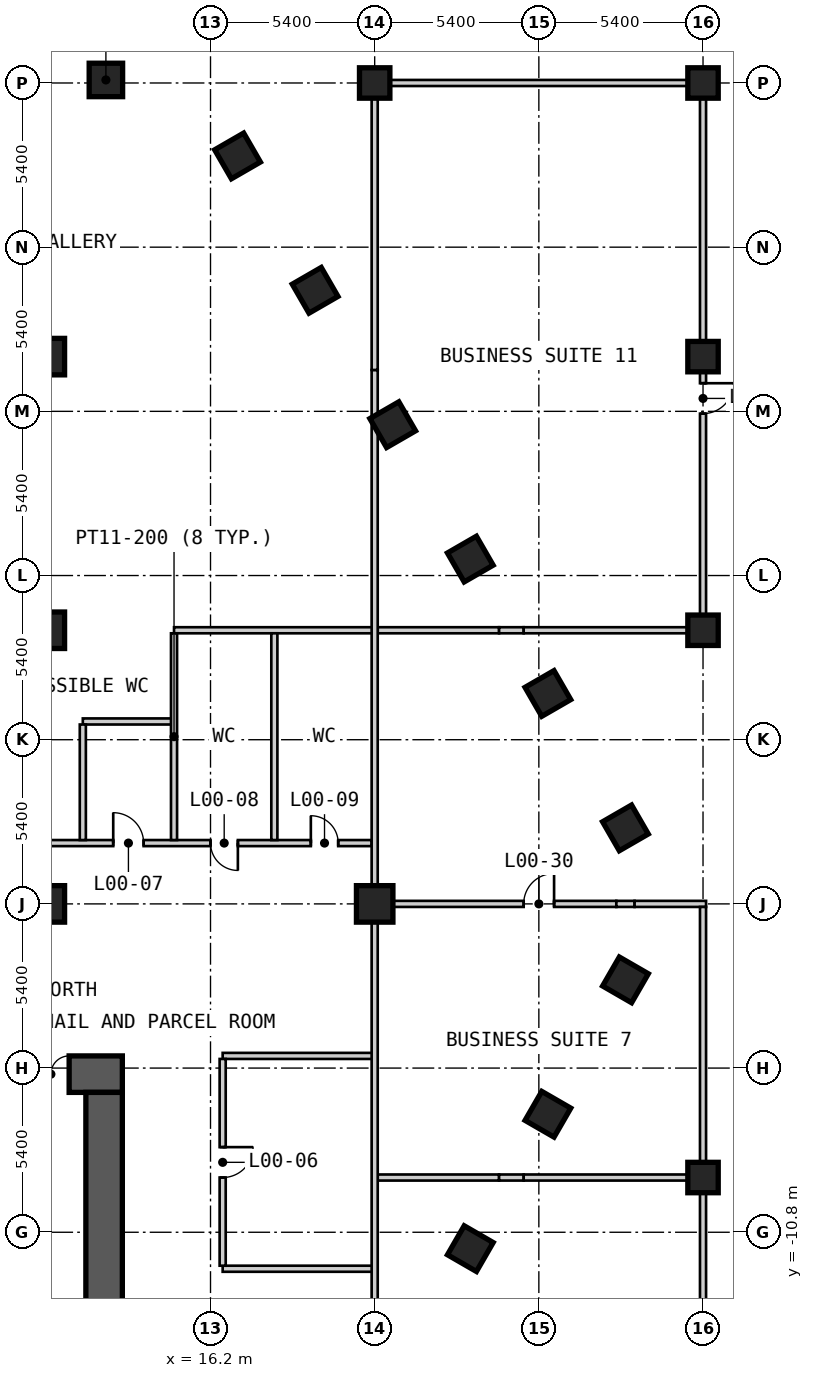
"""IFC4 building model, lengths in metres.
Left out: names, types, materials, properties, quantities, classifications, styles, units other than length and angle.
Written with IfcOpenShell. Run it as: python <this file> out.ifc"""

import sys

from ifc_helpers import new_model, si_unit, direction, frame, frame_2d, origin, origin_2d, place, context, subcontext, project, spatial, rectangle, extrude, element, fill, save


model = new_model("IFC4")
c1 = context("Model", 3, precision=1e-05, world=origin(), true_north=direction((0.0, 1.0)))
c2 = subcontext(c1, "Body", "Model", "MODEL_VIEW")
j1 = project(units=[si_unit("LENGTHUNIT", "METRE"), si_unit("PLANEANGLEUNIT", "RADIAN")], contexts=[c1])
p1 = place(None, origin())
s1 = spatial("IfcSite", under=j1, at=p1, CompositionType="ELEMENT")
p2 = place(p1, origin())
s2 = spatial("IfcBuilding", under=s1, at=p2, CompositionType="ELEMENT")
p3 = place(p2, origin())
s3 = spatial("IfcBuildingStorey", under=s2, at=p3, CompositionType="ELEMENT", Elevation=0.0)
for number, where, z_axis, x_axis in (
    (1, (12.759, 27.1, 0.0), (0.0, 0.0, 1.0), (-1.0, 0.0, 0.0)),
    (2, (24.746, -11.339, 0.0), (0.0, 0.0, 1.0), (0.5, 0.866, 0.0)),
    (3, (27.298, -6.919, 0.0), (0.0, 0.0, 1.0), (0.5, 0.866, 0.0)),
    (4, (29.849, -2.499, 0.0), (0.0, 0.0, 1.0), (0.5, 0.866, 0.0)),
    (5, (29.848, 2.5, 0.0), (0.0, 0.0, 1.0), (-0.5, 0.866, 0.0)),
    (6, (27.297, 6.921, 0.0), (0.0, 0.0, 1.0), (-0.5, 0.866, 0.0)),
    (7, (24.745, 11.341, 0.0), (0.0, 0.0, 1.0), (-0.5, 0.866, 0.0)),
    (8, (22.193, 15.761, 0.0), (0.0, 0.0, 1.0), (-0.5, 0.866, 0.0)),
    (9, (19.641, 20.181, 0.0), (0.0, 0.0, 1.0), (-0.5, 0.866, 0.0)),
    (10, (17.089, 24.601, 0.0), (0.0, 0.0, 1.0), (-0.5, 0.866, 0.0)),
):
    element("IfcColumn", number, at=place(p3, frame(where, z_axis=z_axis, x_axis=x_axis)), inside=s3, PredefinedType="COLUMN", context=c2, shape_type="SweptSolid", body=[
        extrude(rectangle(XDim=1.1, YDim=1.1, at=origin_2d()), origin(), (0.0, 0.0, 1.0), 5.0),
    ])
for number, where, z_axis, x_axis in (
    (11, (10.8, 0.0, 0.0), (0.0, 0.0, 1.0), (1.0, 0.0, 0.0)),
    (12, (10.8, 9.0, 0.0), (0.0, 0.0, 1.0), (1.0, 0.0, 0.0)),
    (13, (10.8, 18.0, 0.0), (0.0, 0.0, 1.0), (1.0, 0.0, 0.0)),
    (14, (21.6, 0.0, 0.0), (0.0, 0.0, 1.0), (1.0, 0.0, 0.0)),
):
    element("IfcColumn", number, at=place(p3, frame(where, z_axis=z_axis, x_axis=x_axis)), inside=s3, PredefinedType="COLUMN", context=c2, shape_type="SweptSolid", body=[
        extrude(rectangle(XDim=1.2, YDim=1.2, at=origin_2d()), origin(), (0.0, 0.0, 1.0), 5.0),
    ])
for number, where, z_axis, x_axis in (
    (15, (21.6, 27.0, 0.0), (0.0, 0.0, 1.0), (1.0, 0.0, 0.0)),
    (16, (32.4, -9.0, 0.0), (0.0, 0.0, 1.0), (1.0, 0.0, 0.0)),
    (17, (32.4, 9.0, 0.0), (0.0, 0.0, 1.0), (1.0, 0.0, 0.0)),
    (18, (32.4, 18.0, 0.0), (0.0, 0.0, 1.0), (1.0, 0.0, 0.0)),
    (19, (32.4, 27.0, 0.0), (0.0, 0.0, 1.0), (1.0, 0.0, 0.0)),
):
    element("IfcColumn", number, at=place(p3, frame(where, z_axis=z_axis, x_axis=x_axis)), inside=s3, PredefinedType="COLUMN", context=c2, shape_type="SweptSolid", body=[
        extrude(rectangle(XDim=1.0, YDim=1.0, at=origin_2d()), origin(), (0.0, 0.0, 1.0), 5.0),
    ])
p4 = place(p3, frame((-13.3, -5.6, 0.0), z_axis=(0.0, 0.0, 1.0), x_axis=(1.0, 0.0, 0.0)))
e20 = element("IfcWall", 20, at=p4, inside=s3, PredefinedType="SHEAR", context=c2, shape_type="SweptSolid", body=[
    extrude(rectangle(XDim=26.6, YDim=1.2, at=frame_2d((13.3, 0.0))), origin(), (0.0, 0.0, 1.0), 4.55),
])
p5 = place(p4, frame((23.65, 0.0, 0.0)))
e21 = element("IfcOpeningElement", 21, at=p5, cuts=e20, PredefinedType="OPENING", context=c2, shape_type="SweptSolid", body=[
    extrude(rectangle(XDim=1.2, YDim=2.1, at=frame_2d((0.6, 1.05))), frame((0.0, 0.61, 0.0), z_axis=(0.0, -1.0, 0.0), x_axis=(1.0, 0.0, 0.0)), (0.0, 0.0, 1.0), 1.22),
])
p6 = place(p3, frame((12.7, -17.8, 0.0), z_axis=(0.0, 0.0, 1.0), x_axis=(0.0, 1.0, 0.0)))
e22 = element("IfcWall", 22, at=p6, inside=s3, PredefinedType="SHEAR", context=c2, shape_type="SweptSolid", body=[
    extrude(rectangle(XDim=11.6, YDim=1.2, at=frame_2d((5.8, 0.0))), origin(), (0.0, 0.0, 1.0), 4.55),
])
p7 = place(p3, frame((16.6, -12.0, 0.0), z_axis=(0.0, 0.0, 1.0), x_axis=(1.0, 0.0, 0.0)))
e23 = element("IfcWall", 23, at=p7, inside=s3, PredefinedType="PARTITIONING", context=c2, shape_type="SweptSolid", body=[
    extrude(rectangle(XDim=5.0, YDim=0.2, at=frame_2d((2.5, 0.0))), origin(), (0.0, 0.0, 1.0), 4.55),
])
p8 = place(p3, frame((21.7, -9.0, 0.0), z_axis=(0.0, 0.0, 1.0), x_axis=(1.0, 0.0, 0.0)))
e24 = element("IfcWall", 24, at=p8, inside=s3, PredefinedType="PARTITIONING", context=c2, shape_type="SweptSolid", body=[
    extrude(rectangle(XDim=3.992, YDim=0.2, at=frame_2d((1.996, 0.0))), origin(), (0.0, 0.0, 1.0), 4.55),
])
p9 = place(p3, frame((25.692, -9.0, 0.0), z_axis=(0.0, 0.0, 1.0), x_axis=(1.0, 0.0, 0.0)))
e25 = element("IfcWall", 25, at=p9, inside=s3, PredefinedType="PARTITIONING", context=c2, shape_type="SweptSolid", body=[
    extrude(rectangle(XDim=0.809, YDim=0.2, at=frame_2d((0.405, 0.0))), origin(), (0.0, 0.0, 1.0), 3.82),
])
p10 = place(p3, frame((26.501, -9.0, 0.0), z_axis=(0.0, 0.0, 1.0), x_axis=(1.0, 0.0, 0.0)))
e26 = element("IfcWall", 26, at=p10, inside=s3, PredefinedType="PARTITIONING", context=c2, shape_type="SweptSolid", body=[
    extrude(rectangle(XDim=5.799, YDim=0.2, at=frame_2d((2.899, 0.0))), origin(), (0.0, 0.0, 1.0), 4.55),
])
p11 = place(p3, frame((16.6, -5.0, 0.0), z_axis=(0.0, 0.0, 1.0), x_axis=(1.0, 0.0, 0.0)))
e27 = element("IfcWall", 27, at=p11, inside=s3, PredefinedType="PARTITIONING", context=c2, shape_type="SweptSolid", body=[
    extrude(rectangle(XDim=5.0, YDim=0.2, at=frame_2d((2.5, 0.0))), origin(), (0.0, 0.0, 1.0), 4.55),
])
p12 = place(p3, frame((21.7, 0.0, 0.0), z_axis=(0.0, 0.0, 1.0), x_axis=(1.0, 0.0, 0.0)))
e28 = element("IfcWall", 28, at=p12, inside=s3, PredefinedType="PARTITIONING", context=c2, shape_type="SweptSolid", body=[
    extrude(rectangle(XDim=7.848, YDim=0.2, at=frame_2d((3.924, 0.0))), origin(), (0.0, 0.0, 1.0), 4.55),
])
p13 = place(p12, frame((5.801, 0.0, 0.0), z_axis=(0.0, 0.0, 1.0), x_axis=(-1.0, 0.0, 0.0)))
e29 = element("IfcOpeningElement", 29, at=p13, cuts=e28, PredefinedType="OPENING", context=c2, shape_type="SweptSolid", body=[
    extrude(rectangle(XDim=1.0, YDim=2.1, at=frame_2d((0.5, 1.05))), frame((0.0, 0.11, 0.0), z_axis=(0.0, -1.0, 0.0), x_axis=(1.0, 0.0, 0.0)), (0.0, 0.0, 1.0), 0.22),
])
p14 = place(p3, frame((29.548, 0.0, 0.0), z_axis=(0.0, 0.0, 1.0), x_axis=(1.0, 0.0, 0.0)))
e30 = element("IfcWall", 30, at=p14, inside=s3, PredefinedType="PARTITIONING", context=c2, shape_type="SweptSolid", body=[
    extrude(rectangle(XDim=0.601, YDim=0.2, at=frame_2d((0.3, 0.0))), origin(), (0.0, 0.0, 1.0), 3.82),
])
p15 = place(p3, frame((30.149, 0.0, 0.0), z_axis=(0.0, 0.0, 1.0), x_axis=(1.0, 0.0, 0.0)))
e31 = element("IfcWall", 31, at=p15, inside=s3, PredefinedType="PARTITIONING", context=c2, shape_type="SweptSolid", body=[
    extrude(rectangle(XDim=2.351, YDim=0.2, at=frame_2d((1.176, 0.0))), origin(), (0.0, 0.0, 1.0), 4.55),
])
p16 = place(p3, frame((-0.6, 2.0, 0.0), z_axis=(0.0, 0.0, 1.0), x_axis=(1.0, 0.0, 0.0)))
e32 = element("IfcWall", 32, at=p16, inside=s3, PredefinedType="PARTITIONING", context=c2, shape_type="SweptSolid", body=[
    extrude(rectangle(XDim=22.1, YDim=0.2, at=frame_2d((11.05, 0.0))), origin(), (0.0, 0.0, 1.0), 4.55),
])
p17 = place(p16, frame((13.6, 0.0, 0.0)))
e33 = element("IfcOpeningElement", 33, at=p17, cuts=e32, PredefinedType="OPENING", context=c2, shape_type="SweptSolid", body=[
    extrude(rectangle(XDim=1.0, YDim=2.1, at=frame_2d((0.5, 1.05))), frame((0.0, 0.11, 0.0), z_axis=(0.0, -1.0, 0.0), x_axis=(1.0, 0.0, 0.0)), (0.0, 0.0, 1.0), 0.22),
])
p18 = place(p16, frame((16.8, 0.0, 0.0)))
e34 = element("IfcOpeningElement", 34, at=p18, cuts=e32, PredefinedType="OPENING", context=c2, shape_type="SweptSolid", body=[
    extrude(rectangle(XDim=0.9, YDim=2.1, at=frame_2d((0.45, 1.05))), frame((0.0, 0.11, 0.0), z_axis=(0.0, -1.0, 0.0), x_axis=(1.0, 0.0, 0.0)), (0.0, 0.0, 1.0), 0.22),
])
p19 = place(p16, frame((20.1, 0.0, 0.0)))
e35 = element("IfcOpeningElement", 35, at=p19, cuts=e32, PredefinedType="OPENING", context=c2, shape_type="SweptSolid", body=[
    extrude(rectangle(XDim=0.9, YDim=2.1, at=frame_2d((0.45, 1.05))), frame((0.0, 0.11, 0.0), z_axis=(0.0, -1.0, 0.0), x_axis=(1.0, 0.0, 0.0)), (0.0, 0.0, 1.0), 0.22),
])
p20 = place(p16, frame((5.35, 0.0, 0.0)))
e36 = element("IfcOpeningElement", 36, at=p20, cuts=e32, PredefinedType="OPENING", context=c2, shape_type="SweptSolid", body=[
    extrude(rectangle(XDim=1.8, YDim=2.1, at=frame_2d((0.9, 1.05))), frame((0.0, 0.11, 0.0), z_axis=(0.0, -1.0, 0.0), x_axis=(1.0, 0.0, 0.0)), (0.0, 0.0, 1.0), 0.22),
])
p21 = place(p3, frame((12.0, 6.0, 0.0), z_axis=(0.0, 0.0, 1.0), x_axis=(1.0, 0.0, 0.0)))
e37 = element("IfcWall", 37, at=p21, inside=s3, PredefinedType="PARTITIONING", context=c2, shape_type="SweptSolid", body=[
    extrude(rectangle(XDim=3.0, YDim=0.2, at=frame_2d((1.5, 0.0))), origin(), (0.0, 0.0, 1.0), 4.55),
])
p22 = place(p3, frame((15.0, 9.0, 0.0), z_axis=(0.0, 0.0, 1.0), x_axis=(1.0, 0.0, 0.0)))
e38 = element("IfcWall", 38, at=p22, inside=s3, PredefinedType="PARTITIONING", context=c2, shape_type="SweptSolid", body=[
    extrude(rectangle(XDim=6.6, YDim=0.2, at=frame_2d((3.3, 0.0))), origin(), (0.0, 0.0, 1.0), 4.55),
])
p23 = place(p3, frame((21.7, 9.0, 0.0), z_axis=(0.0, 0.0, 1.0), x_axis=(1.0, 0.0, 0.0)))
e39 = element("IfcWall", 39, at=p23, inside=s3, PredefinedType="PARTITIONING", context=c2, shape_type="SweptSolid", body=[
    extrude(rectangle(XDim=3.992, YDim=0.2, at=frame_2d((1.996, 0.0))), origin(), (0.0, 0.0, 1.0), 4.55),
])
p24 = place(p3, frame((25.692, 9.0, 0.0), z_axis=(0.0, 0.0, 1.0), x_axis=(1.0, 0.0, 0.0)))
e40 = element("IfcWall", 40, at=p24, inside=s3, PredefinedType="PARTITIONING", context=c2, shape_type="SweptSolid", body=[
    extrude(rectangle(XDim=0.809, YDim=0.2, at=frame_2d((0.405, 0.0))), origin(), (0.0, 0.0, 1.0), 3.82),
])
p25 = place(p3, frame((26.501, 9.0, 0.0), z_axis=(0.0, 0.0, 1.0), x_axis=(1.0, 0.0, 0.0)))
e41 = element("IfcWall", 41, at=p25, inside=s3, PredefinedType="PARTITIONING", context=c2, shape_type="SweptSolid", body=[
    extrude(rectangle(XDim=5.999, YDim=0.2, at=frame_2d((3.0, 0.0))), origin(), (0.0, 0.0, 1.0), 4.55),
])
p26 = place(p3, frame((21.6, 27.0, 0.0), z_axis=(0.0, 0.0, 1.0), x_axis=(1.0, 0.0, 0.0)))
e42 = element("IfcWall", 42, at=p26, inside=s3, PredefinedType="PARTITIONING", context=c2, shape_type="SweptSolid", body=[
    extrude(rectangle(XDim=10.9, YDim=0.2, at=frame_2d((5.45, 0.0))), origin(), (0.0, 0.0, 1.0), 4.55),
])
p27 = place(p3, frame((12.0, 2.1, 0.0), z_axis=(0.0, 0.0, 1.0), x_axis=(0.0, 1.0, 0.0)))
e43 = element("IfcWall", 43, at=p27, inside=s3, PredefinedType="PARTITIONING", context=c2, shape_type="SweptSolid", body=[
    extrude(rectangle(XDim=3.8, YDim=0.2, at=frame_2d((1.9, 0.0))), origin(), (0.0, 0.0, 1.0), 4.55),
])
p28 = place(p3, frame((15.0, 2.1, 0.0), z_axis=(0.0, 0.0, 1.0), x_axis=(0.0, 1.0, 0.0)))
e44 = element("IfcWall", 44, at=p28, inside=s3, PredefinedType="PARTITIONING", context=c2, shape_type="SweptSolid", body=[
    extrude(rectangle(XDim=6.8, YDim=0.2, at=frame_2d((3.4, 0.0))), origin(), (0.0, 0.0, 1.0), 4.55),
])
p29 = place(p3, frame((16.6, -11.9, 0.0), z_axis=(0.0, 0.0, 1.0), x_axis=(0.0, 1.0, 0.0)))
e45 = element("IfcWall", 45, at=p29, inside=s3, PredefinedType="PARTITIONING", context=c2, shape_type="SweptSolid", body=[
    extrude(rectangle(XDim=6.8, YDim=0.2, at=frame_2d((3.4, 0.0))), origin(), (0.0, 0.0, 1.0), 4.55),
])
p30 = place(p29, frame((2.9, 0.0, 0.0)))
e46 = element("IfcOpeningElement", 46, at=p30, cuts=e45, PredefinedType="OPENING", context=c2, shape_type="SweptSolid", body=[
    extrude(rectangle(XDim=1.0, YDim=2.1, at=frame_2d((0.5, 1.05))), frame((0.0, 0.11, 0.0), z_axis=(0.0, -1.0, 0.0), x_axis=(1.0, 0.0, 0.0)), (0.0, 0.0, 1.0), 0.22),
])
p31 = place(p3, frame((18.3, 2.1, 0.0), z_axis=(0.0, 0.0, 1.0), x_axis=(0.0, 1.0, 0.0)))
e47 = element("IfcWall", 47, at=p31, inside=s3, PredefinedType="PARTITIONING", context=c2, shape_type="SweptSolid", body=[
    extrude(rectangle(XDim=6.8, YDim=0.2, at=frame_2d((3.4, 0.0))), origin(), (0.0, 0.0, 1.0), 4.55),
])
p32 = place(p3, frame((21.6, -16.015, 0.0), z_axis=(0.0, 0.0, 1.0), x_axis=(0.0, 1.0, 0.0)))
e48 = element("IfcWall", 48, at=p32, inside=s3, PredefinedType="PARTITIONING", context=c2, shape_type="SweptSolid", body=[
    extrude(rectangle(XDim=32.03, YDim=0.2, at=frame_2d((16.015, 0.0))), origin(), (0.0, 0.0, 1.0), 4.55),
])
p33 = place(p3, frame((21.6, 16.015, 0.0), z_axis=(0.0, 0.0, 1.0), x_axis=(0.0, 1.0, 0.0)))
e49 = element("IfcWall", 49, at=p33, inside=s3, PredefinedType="PARTITIONING", context=c2, shape_type="SweptSolid", body=[
    extrude(rectangle(XDim=1.546, YDim=0.2, at=frame_2d((0.773, 0.0))), origin(), (0.0, 0.0, 1.0), 3.82),
])
p34 = place(p3, frame((21.6, 17.561, 0.0), z_axis=(0.0, 0.0, 1.0), x_axis=(0.0, 1.0, 0.0)))
e50 = element("IfcWall", 50, at=p34, inside=s3, PredefinedType="PARTITIONING", context=c2, shape_type="SweptSolid", body=[
    extrude(rectangle(XDim=9.339, YDim=0.2, at=frame_2d((4.669, 0.0))), origin(), (0.0, 0.0, 1.0), 4.55),
])
p35 = place(p3, frame((32.4, -17.9, 0.0), z_axis=(0.0, 0.0, 1.0), x_axis=(0.0, 1.0, 0.0)))
e51 = element("IfcWall", 51, at=p35, inside=s3, PredefinedType="PARTITIONING", context=c2, shape_type="SweptSolid", body=[
    extrude(rectangle(XDim=17.8, YDim=0.2, at=frame_2d((8.9, 0.0))), origin(), (0.0, 0.0, 1.0), 4.55),
])
p36 = place(p3, frame((32.4, 9.1, 0.0), z_axis=(0.0, 0.0, 1.0), x_axis=(0.0, 1.0, 0.0)))
e52 = element("IfcWall", 52, at=p36, inside=s3, PredefinedType="PARTITIONING", context=c2, shape_type="SweptSolid", body=[
    extrude(rectangle(XDim=17.8, YDim=0.2, at=frame_2d((8.9, 0.0))), origin(), (0.0, 0.0, 1.0), 4.55),
])
p37 = place(p36, frame((7.025, 0.0, 0.0)))
e53 = element("IfcOpeningElement", 53, at=p37, cuts=e52, PredefinedType="OPENING", context=c2, shape_type="SweptSolid", body=[
    extrude(rectangle(XDim=1.0, YDim=2.1, at=frame_2d((0.5, 1.05))), frame((0.0, 0.11, 0.0), z_axis=(0.0, -1.0, 0.0), x_axis=(1.0, 0.0, 0.0)), (0.0, 0.0, 1.0), 0.22),
])
p38 = place(p30, origin())
e54 = element("IfcDoor", 54, at=p38, inside=s3, OperationType="SINGLE_SWING_RIGHT", PredefinedType="DOOR", context=c2, shape_type="SweptSolid", body=[
    extrude(rectangle(XDim=1.0, YDim=2.1, at=frame_2d((0.5, 1.05))), frame((0.0, 0.025, 0.0), z_axis=(0.0, -1.0, 0.0), x_axis=(1.0, 0.0, 0.0)), (0.0, 0.0, 1.0), 0.05),
])
fill(e46, e54)
p39 = place(p17, origin())
e55 = element("IfcDoor", 55, at=p39, inside=s3, OperationType="SINGLE_SWING_LEFT", PredefinedType="DOOR", context=c2, shape_type="SweptSolid", body=[
    extrude(rectangle(XDim=1.0, YDim=2.1, at=frame_2d((0.5, 1.05))), frame((0.0, 0.025, 0.0), z_axis=(0.0, -1.0, 0.0), x_axis=(1.0, 0.0, 0.0)), (0.0, 0.0, 1.0), 0.05),
])
fill(e33, e55)
p40 = place(p18, origin())
e56 = element("IfcDoor", 56, at=p40, inside=s3, OperationType="SINGLE_SWING_RIGHT", PredefinedType="DOOR", context=c2, shape_type="SweptSolid", body=[
    extrude(rectangle(XDim=0.9, YDim=2.1, at=frame_2d((0.45, 1.05))), frame((0.0, 0.025, 0.0), z_axis=(0.0, -1.0, 0.0), x_axis=(1.0, 0.0, 0.0)), (0.0, 0.0, 1.0), 0.05),
])
fill(e34, e56)
p41 = place(p19, origin())
e57 = element("IfcDoor", 57, at=p41, inside=s3, OperationType="SINGLE_SWING_LEFT", PredefinedType="DOOR", context=c2, shape_type="SweptSolid", body=[
    extrude(rectangle(XDim=0.9, YDim=2.1, at=frame_2d((0.45, 1.05))), frame((0.0, 0.025, 0.0), z_axis=(0.0, -1.0, 0.0), x_axis=(1.0, 0.0, 0.0)), (0.0, 0.0, 1.0), 0.05),
])
fill(e35, e57)
p42 = place(p13, origin())
e58 = element("IfcDoor", 58, at=p42, inside=s3, OperationType="SINGLE_SWING_LEFT", PredefinedType="DOOR", context=c2, shape_type="SweptSolid", body=[
    extrude(rectangle(XDim=1.0, YDim=2.1, at=frame_2d((0.5, 1.05))), frame((0.0, 0.025, 0.0), z_axis=(0.0, -1.0, 0.0), x_axis=(1.0, 0.0, 0.0)), (0.0, 0.0, 1.0), 0.05),
])
fill(e29, e58)
p43 = place(p37, origin())
e59 = element("IfcDoor", 59, at=p43, inside=s3, OperationType="SINGLE_SWING_RIGHT", PredefinedType="DOOR", context=c2, shape_type="SweptSolid", body=[
    extrude(rectangle(XDim=1.0, YDim=2.1, at=frame_2d((0.5, 1.05))), frame((0.0, 0.025, 0.0), z_axis=(0.0, -1.0, 0.0), x_axis=(1.0, 0.0, 0.0)), (0.0, 0.0, 1.0), 0.05),
])
fill(e53, e59)
p44 = place(p5, origin())
e60 = element("IfcDoor", 60, at=p44, inside=s3, OperationType="DOUBLE_DOOR_SINGLE_SWING", PredefinedType="DOOR", context=c2, shape_type="SweptSolid", body=[
    extrude(rectangle(XDim=1.2, YDim=2.1, at=frame_2d((0.6, 1.05))), frame((0.0, 0.025, 0.0), z_axis=(0.0, -1.0, 0.0), x_axis=(1.0, 0.0, 0.0)), (0.0, 0.0, 1.0), 0.05),
])
fill(e21, e60)
save(model, sys.argv[1])
